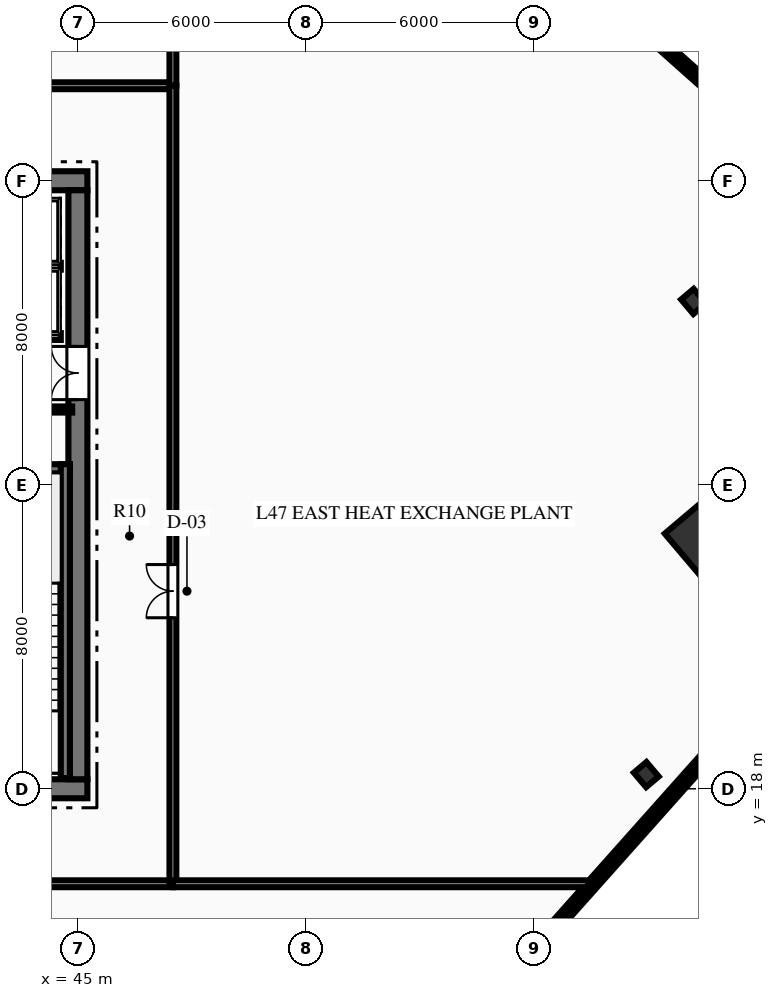
"""IFC4 building model, lengths in metres.
Left out: names, types, materials, properties, quantities, classifications, styles, units other than length and angle.
Written with IfcOpenShell. Run it as: python <this file> out.ifc"""

import sys

from ifc_helpers import new_model, si_unit, direction, frame, frame_2d, origin, origin_2d, place, context, subcontext, project, spatial, rectangle, hollow_rectangle, i_section, extrude, element, fill, save


model = new_model("IFC4")
c1 = context("Model", 3, precision=1e-05, world=origin(), true_north=direction((0.0, 1.0)))
c2 = subcontext(c1, "Body", "Model", "MODEL_VIEW")
j1 = project(units=[si_unit("LENGTHUNIT", "METRE"), si_unit("PLANEANGLEUNIT", "RADIAN")], contexts=[c1])
p1 = place(None, origin())
s1 = spatial("IfcSite", under=j1, at=p1, CompositionType="ELEMENT")
p2 = place(p1, origin())
s2 = spatial("IfcBuilding", under=s1, at=p2, CompositionType="ELEMENT")
p3 = place(p2, frame((0.0, 0.0, 189.45)))
s3 = spatial("IfcBuildingStorey", under=s2, at=p3, CompositionType="ELEMENT", Elevation=189.45)
p4 = place(p3, frame((26.75, 18.0, 0.0), z_axis=(0.0, 0.0, 1.0), x_axis=(1.0, 0.0, 0.0)))
e1 = element("IfcWall", 1, at=p4, inside=s3, PredefinedType="SHEAR", context=c2, shape_type="SweptSolid", body=[
    extrude(rectangle(XDim=18.5, YDim=0.5, at=frame_2d((9.25, 0.0))), origin(), (0.0, 0.0, 1.0), 4.5),
])
p5 = place(p4, frame((7.35, 0.0, 0.0)))
e2 = element("IfcOpeningElement", 2, at=p5, cuts=e1, PredefinedType="OPENING", context=c2, shape_type="SweptSolid", body=[
    extrude(rectangle(XDim=1.1, YDim=2.15, at=frame_2d((0.55, 1.075))), frame((0.0, 0.26, 0.0), z_axis=(0.0, -1.0, 0.0), x_axis=(1.0, 0.0, 0.0)), (0.0, 0.0, 1.0), 0.52),
])
p6 = place(p4, frame((10.05, 0.0, 0.0)))
e3 = element("IfcOpeningElement", 3, at=p6, cuts=e1, PredefinedType="OPENING", context=c2, shape_type="SweptSolid", body=[
    extrude(rectangle(XDim=1.1, YDim=2.15, at=frame_2d((0.55, 1.075))), frame((0.0, 0.26, 0.0), z_axis=(0.0, -1.0, 0.0), x_axis=(1.0, 0.0, 0.0)), (0.0, 0.0, 1.0), 0.52),
])
p7 = place(p3, frame((26.75, 34.0, 0.0), z_axis=(0.0, 0.0, 1.0), x_axis=(1.0, 0.0, 0.0)))
e4 = element("IfcWall", 4, at=p7, inside=s3, PredefinedType="SHEAR", context=c2, shape_type="SweptSolid", body=[
    extrude(rectangle(XDim=18.5, YDim=0.5, at=frame_2d((9.25, 0.0))), origin(), (0.0, 0.0, 1.0), 4.5),
])
p8 = place(p7, frame((5.545, 0.0, 0.0)))
e5 = element("IfcOpeningElement", 5, at=p8, cuts=e4, PredefinedType="OPENING", context=c2, shape_type="SweptSolid", body=[
    extrude(rectangle(XDim=1.05, YDim=2.15, at=frame_2d((0.525, 1.075))), frame((0.0, 0.26, 0.0), z_axis=(0.0, -1.0, 0.0), x_axis=(1.0, 0.0, 0.0)), (0.0, 0.0, 1.0), 0.52),
])
p9 = place(p7, frame((13.935, 0.0, 0.0)))
e6 = element("IfcOpeningElement", 6, at=p9, cuts=e4, PredefinedType="OPENING", context=c2, shape_type="SweptSolid", body=[
    extrude(rectangle(XDim=1.1, YDim=2.15, at=frame_2d((0.55, 1.075))), frame((0.0, 0.26, 0.0), z_axis=(0.0, -1.0, 0.0), x_axis=(1.0, 0.0, 0.0)), (0.0, 0.0, 1.0), 0.52),
])
p10 = place(p7, frame((16.185, 0.0, 0.0)))
e7 = element("IfcOpeningElement", 7, at=p10, cuts=e4, PredefinedType="OPENING", context=c2, shape_type="SweptSolid", body=[
    extrude(rectangle(XDim=1.1, YDim=2.15, at=frame_2d((0.55, 1.075))), frame((0.0, 0.26, 0.0), z_axis=(0.0, -1.0, 0.0), x_axis=(1.0, 0.0, 0.0)), (0.0, 0.0, 1.0), 0.52),
])
p11 = place(p3, frame((45.0, 18.25, 0.0), z_axis=(0.0, 0.0, 1.0), x_axis=(0.0, 1.0, 0.0)))
e8 = element("IfcWall", 8, at=p11, inside=s3, PredefinedType="SHEAR", context=c2, shape_type="SweptSolid", body=[
    extrude(rectangle(XDim=15.5, YDim=0.5, at=frame_2d((7.75, 0.0))), origin(), (0.0, 0.0, 1.0), 4.5),
])
p12 = place(p11, frame((9.99, 0.0, 0.0)))
e9 = element("IfcOpeningElement", 9, at=p12, cuts=e8, PredefinedType="OPENING", context=c2, shape_type="SweptSolid", body=[
    extrude(rectangle(XDim=1.4, YDim=2.2, at=frame_2d((0.7, 1.1))), frame((0.0, 0.26, 0.0), z_axis=(0.0, -1.0, 0.0), x_axis=(1.0, 0.0, 0.0)), (0.0, 0.0, 1.0), 0.52),
])
p13 = place(p3, frame((40.81, 26.42, 0.0), z_axis=(0.0, 0.0, 1.0), x_axis=(1.0, 0.0, 0.0)))
e10 = element("IfcWall", 10, at=p13, inside=s3, PredefinedType="SHEAR", context=c2, shape_type="SweptSolid", body=[
    extrude(rectangle(XDim=3.98, YDim=0.24, at=frame_2d((1.99, 0.0))), origin(), (0.0, 0.0, 1.0), 4.5),
])
p14 = place(p3, frame((44.67, 18.28, 0.0), z_axis=(0.0, 0.0, 1.0), x_axis=(0.0, 1.0, 0.0)))
e11 = element("IfcWall", 11, at=p14, inside=s3, PredefinedType="SHEAR", context=c2, shape_type="SweptSolid", body=[
    extrude(rectangle(XDim=8.26, YDim=0.24, at=frame_2d((4.13, 0.0))), origin(), (0.0, 0.0, 1.0), 4.5),
])
p15 = place(p3, frame((61.465, 24.629, 0.0), z_axis=(0.0, 0.0, 1.0), x_axis=(0.763232469783, 0.646123979643, 0.0)))
e12 = element("IfcColumn", 12, at=p15, inside=s3, PredefinedType="COLUMN", context=c2, shape_type="SweptSolid", body=[
    extrude(hollow_rectangle(XDim=1.45, YDim=1.45, WallThickness=0.07, at=origin_2d()), origin(), (0.0, 0.0, 1.0), 4.5),
])
for number, where, z_axis, x_axis in (
    (13, (59.956, 18.373, 0.0), (0.0, 0.0, 1.0), (0.763, 0.646, 0.0)),
    (14, (61.199, 30.824, 0.0), (0.0, 0.0, 1.0), (0.763, 0.646, 0.0)),
):
    element("IfcColumn", number, at=place(p3, frame(where, z_axis=z_axis, x_axis=x_axis)), inside=s3, PredefinedType="COLUMN", context=c2, shape_type="SweptSolid", body=[
        extrude(i_section(OverallWidth=0.432, OverallDepth=0.498, WebThickness=0.056, FlangeThickness=0.089, at=origin_2d()), origin(), (0.0, 0.0, 1.0), 4.5),
    ])
p16 = place(p3, frame((67.659, 25.718, 0.0), z_axis=(0.0, 0.0, 1.0), x_axis=(-0.665232628424, -0.746636156425, 0.0)))
e15 = element("IfcWall", 15, at=p16, inside=s3, PredefinedType="STANDARD", context=c2, shape_type="SweptSolid", body=[
    extrude(rectangle(XDim=20.85, YDim=0.28, at=frame_2d((10.425, 0.0))), origin(), (0.0, 0.0, 1.0), 1.15),
])
p17 = place(p3, frame((52.671, 44.429, 0.0), z_axis=(0.0, 0.0, 1.0), x_axis=(0.746637837587, -0.665230741535, 0.0)))
e16 = element("IfcWall", 16, at=p17, inside=s3, PredefinedType="STANDARD", context=c2, shape_type="SweptSolid", body=[
    extrude(rectangle(XDim=19.637, YDim=0.28, at=frame_2d((9.819, 0.0))), origin(), (0.0, 0.0, 1.0), 1.15),
])
p18 = place(p3, frame((40.8, 27.98, 0.0), z_axis=(0.0, 0.0, 1.0), x_axis=(1.0, 0.0, 0.0)))
e17 = element("IfcWall", 17, at=p18, inside=s3, PredefinedType="PARTITIONING", context=c2, shape_type="SweptSolid", body=[
    extrude(rectangle(XDim=4.05, YDim=0.16, at=frame_2d((2.025, 0.0))), origin(), (0.0, 0.0, 1.0), 4.09),
])
p19 = place(p18, frame((1.475, 0.0, 0.0)))
e18 = element("IfcOpeningElement", 18, at=p19, cuts=e17, PredefinedType="OPENING", context=c2, shape_type="SweptSolid", body=[
    extrude(rectangle(XDim=0.95, YDim=2.15, at=frame_2d((0.475, 1.075))), frame((0.0, 0.09, 0.0), z_axis=(0.0, -1.0, 0.0), x_axis=(1.0, 0.0, 0.0)), (0.0, 0.0, 1.0), 0.18),
])
p20 = place(p3, frame((40.12, 29.9, 0.0), z_axis=(0.0, 0.0, 1.0), x_axis=(1.0, 0.0, 0.0)))
e19 = element("IfcWall", 19, at=p20, inside=s3, PredefinedType="PARTITIONING", context=c2, shape_type="SweptSolid", body=[
    extrude(rectangle(XDim=4.43, YDim=0.18, at=frame_2d((2.215, 0.0))), origin(), (0.0, 0.0, 1.0), 4.09),
])
p21 = place(p20, frame((0.565, 0.0, 0.0)))
e20 = element("IfcOpeningElement", 20, at=p21, cuts=e19, PredefinedType="OPENING", context=c2, shape_type="SweptSolid", body=[
    extrude(rectangle(XDim=1.1, YDim=2.15, at=frame_2d((0.55, 1.075))), frame((0.0, 0.1, 0.0), z_axis=(0.0, -1.0, 0.0), x_axis=(1.0, 0.0, 0.0)), (0.0, 0.0, 1.0), 0.2),
])
p22 = place(p20, frame((2.815, 0.0, 0.0)))
e21 = element("IfcOpeningElement", 21, at=p22, cuts=e19, PredefinedType="OPENING", context=c2, shape_type="SweptSolid", body=[
    extrude(rectangle(XDim=1.1, YDim=2.15, at=frame_2d((0.55, 1.075))), frame((0.0, 0.1, 0.0), z_axis=(0.0, -1.0, 0.0), x_axis=(1.0, 0.0, 0.0)), (0.0, 0.0, 1.0), 0.2),
])
p23 = place(p3, frame((40.12, 31.75, 0.0), z_axis=(0.0, 0.0, 1.0), x_axis=(1.0, 0.0, 0.0)))
e22 = element("IfcWall", 22, at=p23, inside=s3, PredefinedType="PARTITIONING", context=c2, shape_type="SweptSolid", body=[
    extrude(rectangle(XDim=4.43, YDim=0.18, at=frame_2d((2.215, 0.0))), origin(), (0.0, 0.0, 1.0), 4.09),
])
p24 = place(p3, frame((24.5, 15.5, 0.0), z_axis=(0.0, 0.0, 1.0), x_axis=(1.0, 0.0, 0.0)))
e23 = element("IfcWall", 23, at=p24, inside=s3, PredefinedType="PARTITIONING", context=c2, shape_type="SweptSolid", body=[
    extrude(rectangle(XDim=23.0, YDim=0.18, at=frame_2d((11.5, 0.0))), origin(), (0.0, 0.0, 1.0), 4.09),
])
p25 = place(p24, frame((7.15, 0.0, 0.0)))
e24 = element("IfcOpeningElement", 24, at=p25, cuts=e23, PredefinedType="OPENING", context=c2, shape_type="SweptSolid", body=[
    extrude(rectangle(XDim=1.1, YDim=2.15, at=frame_2d((0.55, 1.075))), frame((0.0, 0.1, 0.0), z_axis=(0.0, -1.0, 0.0), x_axis=(1.0, 0.0, 0.0)), (0.0, 0.0, 1.0), 0.2),
])
p26 = place(p24, frame((13.3, 0.0, 0.0)))
e25 = element("IfcOpeningElement", 25, at=p26, cuts=e23, PredefinedType="OPENING", context=c2, shape_type="SweptSolid", body=[
    extrude(rectangle(XDim=1.1, YDim=2.15, at=frame_2d((0.55, 1.075))), frame((0.0, 0.1, 0.0), z_axis=(0.0, -1.0, 0.0), x_axis=(1.0, 0.0, 0.0)), (0.0, 0.0, 1.0), 0.2),
])
p27 = place(p3, frame((24.5, 36.5, 0.0), z_axis=(0.0, 0.0, 1.0), x_axis=(1.0, 0.0, 0.0)))
e26 = element("IfcWall", 26, at=p27, inside=s3, PredefinedType="PARTITIONING", context=c2, shape_type="SweptSolid", body=[
    extrude(rectangle(XDim=23.0, YDim=0.18, at=frame_2d((11.5, 0.0))), origin(), (0.0, 0.0, 1.0), 4.09),
])
p28 = place(p27, frame((7.15, 0.0, 0.0)))
e27 = element("IfcOpeningElement", 27, at=p28, cuts=e26, PredefinedType="OPENING", context=c2, shape_type="SweptSolid", body=[
    extrude(rectangle(XDim=1.1, YDim=2.15, at=frame_2d((0.55, 1.075))), frame((0.0, 0.1, 0.0), z_axis=(0.0, -1.0, 0.0), x_axis=(1.0, 0.0, 0.0)), (0.0, 0.0, 1.0), 0.2),
])
p29 = place(p27, frame((14.75, 0.0, 0.0)))
e28 = element("IfcOpeningElement", 28, at=p29, cuts=e26, PredefinedType="OPENING", context=c2, shape_type="SweptSolid", body=[
    extrude(rectangle(XDim=1.1, YDim=2.15, at=frame_2d((0.55, 1.075))), frame((0.0, 0.1, 0.0), z_axis=(0.0, -1.0, 0.0), x_axis=(1.0, 0.0, 0.0)), (0.0, 0.0, 1.0), 0.2),
])
p30 = place(p3, frame((47.5, 15.5, 0.0), z_axis=(0.0, 0.0, 1.0), x_axis=(0.0, 1.0, 0.0)))
e29 = element("IfcWall", 29, at=p30, inside=s3, PredefinedType="PARTITIONING", context=c2, shape_type="SweptSolid", body=[
    extrude(rectangle(XDim=21.0, YDim=0.18, at=frame_2d((10.5, 0.0))), origin(), (0.0, 0.0, 1.0), 4.09),
])
p31 = place(p30, frame((7.0, 0.0, 0.0)))
e30 = element("IfcOpeningElement", 30, at=p31, cuts=e29, PredefinedType="OPENING", context=c2, shape_type="SweptSolid", body=[
    extrude(rectangle(XDim=1.4, YDim=2.2, at=frame_2d((0.7, 1.1))), frame((0.0, 0.1, 0.0), z_axis=(0.0, -1.0, 0.0), x_axis=(1.0, 0.0, 0.0)), (0.0, 0.0, 1.0), 0.2),
])
p32 = place(p3, frame((47.5, 15.5, 0.0), z_axis=(0.0, 0.0, 1.0), x_axis=(1.0, 0.0, 0.0)))
e31 = element("IfcWall", 31, at=p32, inside=s3, PredefinedType="PARTITIONING", context=c2, shape_type="SweptSolid", body=[
    extrude(rectangle(XDim=11.001, YDim=0.18, at=frame_2d((5.5, 0.0))), origin(), (0.0, 0.0, 1.0), 4.09),
])
p33 = place(p3, frame((47.5, 36.5, 0.0), z_axis=(0.0, 0.0, 1.0), x_axis=(0.0, 1.0, 0.0)))
e32 = element("IfcWall", 32, at=p33, inside=s3, PredefinedType="PARTITIONING", context=c2, shape_type="SweptSolid", body=[
    extrude(rectangle(XDim=12.483, YDim=0.18, at=frame_2d((6.241, 0.0))), origin(), (0.0, 0.0, 1.0), 2.885),
])
p34 = place(p12, origin())
e33 = element("IfcDoor", 33, at=p34, inside=s3, OperationType="DOUBLE_DOOR_SINGLE_SWING", PredefinedType="DOOR", context=c2, shape_type="SweptSolid", body=[
    extrude(rectangle(XDim=1.4, YDim=2.2, at=frame_2d((0.7, 1.1))), frame((0.0, 0.025, 0.0), z_axis=(0.0, -1.0, 0.0), x_axis=(1.0, 0.0, 0.0)), (0.0, 0.0, 1.0), 0.05),
])
fill(e9, e33)
p35 = place(p31, origin())
e34 = element("IfcDoor", 34, at=p35, inside=s3, OperationType="DOUBLE_DOOR_SINGLE_SWING", PredefinedType="DOOR", context=c2, shape_type="SweptSolid", body=[
    extrude(rectangle(XDim=1.4, YDim=2.2, at=frame_2d((0.7, 1.1))), frame((0.0, 0.025, 0.0), z_axis=(0.0, -1.0, 0.0), x_axis=(1.0, 0.0, 0.0)), (0.0, 0.0, 1.0), 0.05),
])
fill(e30, e34)
save(model, sys.argv[1])
